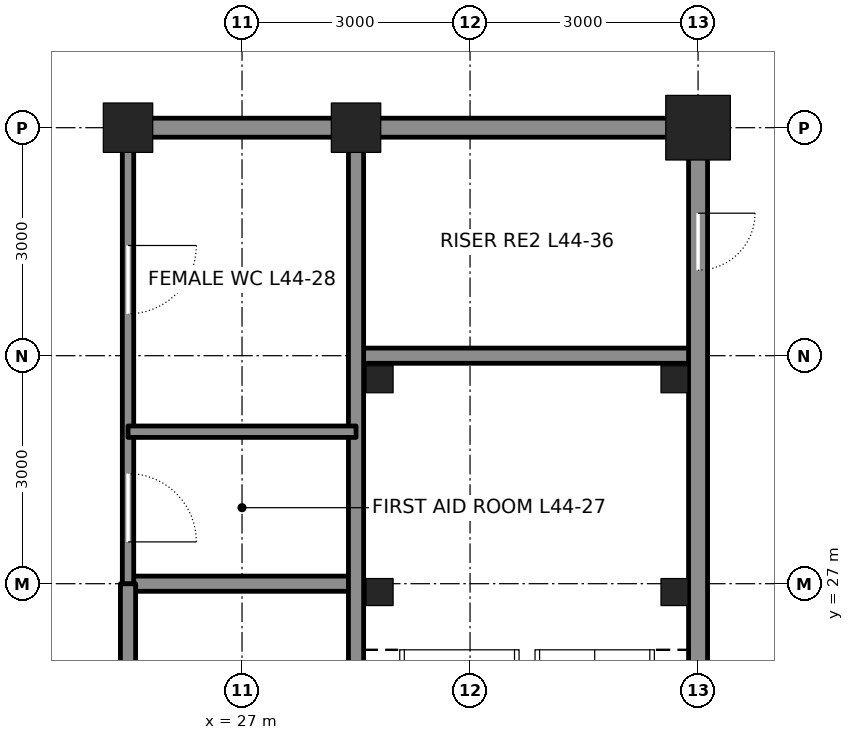
"""IFC4 building model, lengths in metres.
Left out: names, types, materials, properties, quantities, classifications, styles, units other than length and angle.
Written with IfcOpenShell. Run it as: python <this file> out.ifc"""

import sys

from ifc_helpers import new_model, si_unit, direction, frame, frame_2d, origin, origin_2d, place, context, subcontext, project, spatial, rectangle, hollow_rectangle, extrude, element, fill, save


model = new_model("IFC4")
c1 = context("Model", 3, precision=1e-05, world=origin(), true_north=direction((0.0, 1.0)))
c2 = subcontext(c1, "Body", "Model", "MODEL_VIEW")
j1 = project(units=[si_unit("LENGTHUNIT", "METRE"), si_unit("PLANEANGLEUNIT", "RADIAN")], contexts=[c1])
p1 = place(None, origin())
s1 = spatial("IfcSite", under=j1, at=p1, CompositionType="ELEMENT")
p2 = place(p1, origin())
s2 = spatial("IfcBuilding", under=s1, at=p2, CompositionType="ELEMENT")
p3 = place(p2, frame((0.0, 0.0, 201.3)))
s3 = spatial("IfcBuildingStorey", under=s2, at=p3, CompositionType="ELEMENT", Elevation=201.3)
for number, where, z_axis, x_axis in (
    (1, (25.5, 33.0, 0.0), (0.0, 0.0, 1.0), (1.0, 0.0, 0.0)),
    (2, (28.5, 33.0, 0.0), (0.0, 0.0, 1.0), (1.0, 0.0, 0.0)),
):
    element("IfcColumn", number, at=place(p3, frame(where, z_axis=z_axis, x_axis=x_axis)), inside=s3, PredefinedType="COLUMN", context=c2, shape_type="SweptSolid", body=[
        extrude(hollow_rectangle(XDim=0.65, YDim=0.65, WallThickness=0.065, at=origin_2d()), origin(), (0.0, 0.0, 1.0), 4.2),
    ])
p4 = place(p3, frame((33.0, 33.0, 0.0), z_axis=(0.0, 0.0, 1.0), x_axis=(1.0, 0.0, 0.0)))
e3 = element("IfcColumn", 3, at=p4, inside=s3, PredefinedType="COLUMN", context=c2, shape_type="SweptSolid", body=[
    extrude(hollow_rectangle(XDim=0.85, YDim=0.85, WallThickness=0.085, at=origin_2d()), origin(), (0.0, 0.0, 1.0), 4.2),
])
p5 = place(p3, frame((25.5, 27.0, 0.0), z_axis=(0.0, 0.0, 1.0), x_axis=(1.0, 0.0, 0.0)))
e4 = element("IfcWall", 4, at=p5, inside=s3, PredefinedType="SOLIDWALL", context=c2, shape_type="SweptSolid", body=[
    extrude(rectangle(XDim=3.0, YDim=0.2, at=frame_2d((1.5, 0.0))), origin(), (0.0, 0.0, 1.0), 4.04),
])
p6 = place(p3, frame((28.5, 30.0, 0.0), z_axis=(0.0, 0.0, 1.0), x_axis=(1.0, 0.0, 0.0)))
e5 = element("IfcWall", 5, at=p6, inside=s3, PredefinedType="SOLIDWALL", context=c2, shape_type="SweptSolid", body=[
    extrude(rectangle(XDim=4.5, YDim=0.2, at=frame_2d((2.25, 0.0))), origin(), (0.0, 0.0, 1.0), 4.04),
])
p7 = place(p3, frame((25.75, 33.0, 0.0), z_axis=(0.0, 0.0, 1.0), x_axis=(1.0, 0.0, 0.0)))
e6 = element("IfcWall", 6, at=p7, inside=s3, PredefinedType="SOLIDWALL", context=c2, shape_type="SweptSolid", body=[
    extrude(rectangle(XDim=2.5, YDim=0.25, at=frame_2d((1.25, 0.0))), origin(), (0.0, 0.0, 1.0), 3.181),
])
p8 = place(p3, frame((28.75, 33.0, 0.0), z_axis=(0.0, 0.0, 1.0), x_axis=(1.0, 0.0, 0.0)))
e7 = element("IfcWall", 7, at=p8, inside=s3, PredefinedType="SOLIDWALL", context=c2, shape_type="SweptSolid", body=[
    extrude(rectangle(XDim=4.0, YDim=0.25, at=frame_2d((2.0, 0.0))), origin(), (0.0, 0.0, 1.0), 3.181),
])
p9 = place(p3, frame((25.5, 15.0, 0.0), z_axis=(0.0, 0.0, 1.0), x_axis=(0.0, 1.0, 0.0)))
e8 = element("IfcWall", 8, at=p9, inside=s3, PredefinedType="SOLIDWALL", context=c2, shape_type="SweptSolid", body=[
    extrude(rectangle(XDim=12.0, YDim=0.2, at=frame_2d((6.0, 0.0))), origin(), (0.0, 0.0, 1.0), 3.064),
])
p10 = place(p3, frame((25.5, 27.0, 0.0), z_axis=(0.0, 0.0, 1.0), x_axis=(0.0, 1.0, 0.0)))
e9 = element("IfcWall", 9, at=p10, inside=s3, PredefinedType="PARTITIONING", context=c2, shape_type="SweptSolid", body=[
    extrude(rectangle(XDim=5.75, YDim=0.15, at=frame_2d((2.875, 0.0))), origin(), (0.0, 0.0, 1.0), 3.064),
])
p11 = place(p10, frame((0.55, 0.0, 0.0)))
e10 = element("IfcOpeningElement", 10, at=p11, cuts=e9, PredefinedType="OPENING", context=c2, shape_type="SweptSolid", body=[
    extrude(rectangle(XDim=0.9, YDim=2.1, at=frame_2d((0.45, 1.05))), frame((0.0, 0.085, 0.0), z_axis=(0.0, -1.0, 0.0), x_axis=(1.0, 0.0, 0.0)), (0.0, 0.0, 1.0), 0.17),
])
p12 = place(p10, frame((3.55, 0.0, 0.0)))
e11 = element("IfcOpeningElement", 11, at=p12, cuts=e9, PredefinedType="OPENING", context=c2, shape_type="SweptSolid", body=[
    extrude(rectangle(XDim=0.9, YDim=2.1, at=frame_2d((0.45, 1.05))), frame((0.0, 0.085, 0.0), z_axis=(0.0, -1.0, 0.0), x_axis=(1.0, 0.0, 0.0)), (0.0, 0.0, 1.0), 0.17),
])
p13 = place(p3, frame((28.5, 24.25, 0.0), z_axis=(0.0, 0.0, 1.0), x_axis=(0.0, 1.0, 0.0)))
e12 = element("IfcWall", 12, at=p13, inside=s3, PredefinedType="SOLIDWALL", context=c2, shape_type="SweptSolid", body=[
    extrude(rectangle(XDim=8.5, YDim=0.2, at=frame_2d((4.25, 0.0))), origin(), (0.0, 0.0, 1.0), 3.113),
])
p14 = place(p3, frame((33.0, 24.25, 0.0), z_axis=(0.0, 0.0, 1.0), x_axis=(0.0, 1.0, 0.0)))
e13 = element("IfcWall", 13, at=p14, inside=s3, PredefinedType="SOLIDWALL", context=c2, shape_type="SweptSolid", body=[
    extrude(rectangle(XDim=8.5, YDim=0.25, at=frame_2d((4.25, 0.0))), origin(), (0.0, 0.0, 1.0), 3.113),
])
p15 = place(p14, frame((6.875, 0.0, 0.0)))
e14 = element("IfcOpeningElement", 14, at=p15, cuts=e13, PredefinedType="OPENING", context=c2, shape_type="SweptSolid", body=[
    extrude(rectangle(XDim=0.75, YDim=2.1, at=frame_2d((0.375, 1.05))), frame((0.0, 0.135, 0.0), z_axis=(0.0, -1.0, 0.0), x_axis=(1.0, 0.0, 0.0)), (0.0, 0.0, 1.0), 0.27),
])
p16 = place(p3, frame((25.5, 29.0, 0.0), z_axis=(0.0, 0.0, 1.0), x_axis=(1.0, 0.0, 0.0)))
e15 = element("IfcWall", 15, at=p16, inside=s3, PredefinedType="PARTITIONING", context=c2, shape_type="SweptSolid", body=[
    extrude(rectangle(XDim=3.0, YDim=0.15, at=frame_2d((1.5, 0.0))), origin(), (0.0, 0.0, 1.0), 4.04),
])
for number, where, z_axis, x_axis in (
    (16, (28.81, 29.69, 0.0), (0.0, 0.0, 1.0), (1.0, 0.0, 0.0)),
    (17, (32.69, 29.69, 0.0), (0.0, 0.0, 1.0), (1.0, 0.0, 0.0)),
    (18, (28.81, 26.89, 0.0), (0.0, 0.0, 1.0), (1.0, 0.0, 0.0)),
    (19, (32.69, 26.89, 0.0), (0.0, 0.0, 1.0), (1.0, 0.0, 0.0)),
):
    element("IfcColumn", number, at=place(p3, frame(where, z_axis=z_axis, x_axis=x_axis)), inside=s3, PredefinedType="COLUMN", context=c2, shape_type="SweptSolid", body=[
        extrude(hollow_rectangle(XDim=0.356, YDim=0.356, WallThickness=0.009, at=origin_2d()), origin(), (0.0, 0.0, 1.0), 4.2),
    ])
p17 = place(p15, frame((0.75, 0.0, 0.0), z_axis=(0.0, 0.0, 1.0), x_axis=(-1.0, 0.0, 0.0)))
e20 = element("IfcDoor", 20, at=p17, inside=s3, OperationType="SINGLE_SWING_LEFT", PredefinedType="DOOR", context=c2, shape_type="SweptSolid", body=[
    extrude(rectangle(XDim=0.75, YDim=2.1, at=frame_2d((0.375, 1.05))), frame((0.0, 0.025, 0.0), z_axis=(0.0, -1.0, 0.0), x_axis=(1.0, 0.0, 0.0)), (0.0, 0.0, 1.0), 0.05),
])
fill(e14, e20)
p18 = place(p11, frame((0.9, 0.0, 0.0), z_axis=(0.0, 0.0, 1.0), x_axis=(-1.0, 0.0, 0.0)))
e21 = element("IfcDoor", 21, at=p18, inside=s3, OperationType="SINGLE_SWING_RIGHT", PredefinedType="DOOR", context=c2, shape_type="SweptSolid", body=[
    extrude(rectangle(XDim=0.9, YDim=2.1, at=frame_2d((0.45, 1.05))), frame((0.0, 0.025, 0.0), z_axis=(0.0, -1.0, 0.0), x_axis=(1.0, 0.0, 0.0)), (0.0, 0.0, 1.0), 0.05),
])
fill(e10, e21)
p19 = place(p12, frame((0.9, 0.0, 0.0), z_axis=(0.0, 0.0, 1.0), x_axis=(-1.0, 0.0, 0.0)))
e22 = element("IfcDoor", 22, at=p19, inside=s3, OperationType="SINGLE_SWING_LEFT", PredefinedType="DOOR", context=c2, shape_type="SweptSolid", body=[
    extrude(rectangle(XDim=0.9, YDim=2.1, at=frame_2d((0.45, 1.05))), frame((0.0, 0.025, 0.0), z_axis=(0.0, -1.0, 0.0), x_axis=(1.0, 0.0, 0.0)), (0.0, 0.0, 1.0), 0.05),
])
fill(e11, e22)
save(model, sys.argv[1])
